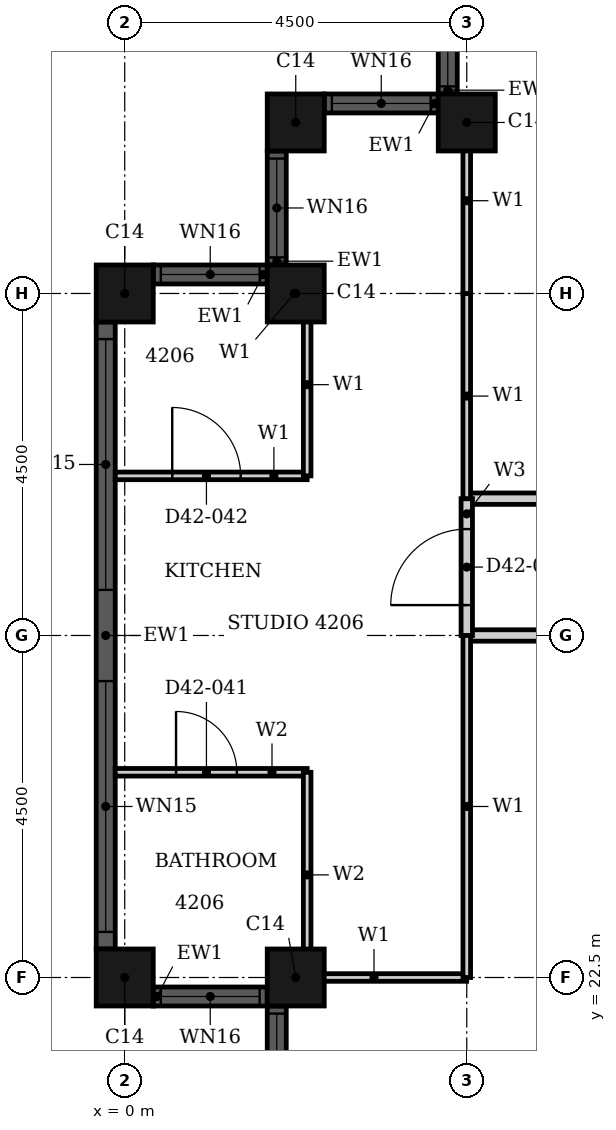
"""IFC4 building model, lengths in metres.
Left out: names, types, materials, properties, quantities, classifications, styles, units other than length and angle.
Written with IfcOpenShell. Run it as: python <this file> out.ifc"""

import sys

from ifc_helpers import new_model, si_unit, direction, frame, frame_2d, origin, origin_2d, place, context, subcontext, project, spatial, rectangle, hollow_rectangle, extrude, element, fill, save


model = new_model("IFC4")
c1 = context("Model", 3, precision=1e-05, world=origin(), true_north=direction((0.0, 1.0)))
c2 = subcontext(c1, "Body", "Model", "MODEL_VIEW")
j1 = project(units=[si_unit("LENGTHUNIT", "METRE"), si_unit("PLANEANGLEUNIT", "RADIAN")], contexts=[c1])
p1 = place(None, origin())
s1 = spatial("IfcSite", under=j1, at=p1, CompositionType="ELEMENT")
p2 = place(p1, origin())
s2 = spatial("IfcBuilding", under=s1, at=p2, CompositionType="ELEMENT")
p3 = place(p2, frame((0.0, 0.0, 169.1)))
s3 = spatial("IfcBuildingStorey", under=s2, at=p3, CompositionType="ELEMENT", Elevation=169.1)
for number, where, z_axis, x_axis in (
    (1, (4.5, 33.75, 0.0), (0.0, 0.0, 1.0), (1.0, 0.0, 0.0)),
    (2, (2.25, 33.75, 0.0), (0.0, 0.0, 1.0), (1.0, 0.0, 0.0)),
    (3, (2.25, 31.5, 0.0), (0.0, 0.0, 1.0), (1.0, 0.0, 0.0)),
    (4, (0.0, 31.5, 0.0), (0.0, 0.0, 1.0), (1.0, 0.0, 0.0)),
    (5, (0.0, 22.5, 0.0), (0.0, 0.0, 1.0), (1.0, 0.0, 0.0)),
    (6, (2.25, 22.5, 0.0), (0.0, 0.0, 1.0), (1.0, 0.0, 0.0)),
):
    element("IfcColumn", number, at=place(p3, frame(where, z_axis=z_axis, x_axis=x_axis)), inside=s3, PredefinedType="COLUMN", context=c2, shape_type="SweptSolid", body=[
        extrude(hollow_rectangle(XDim=0.75, YDim=0.75, WallThickness=0.024, at=origin_2d()), origin(), (0.0, 0.0, 1.0), 3.7),
    ])
p4 = place(p3, frame((4.25, 35.625, 0.0), z_axis=(0.0, 0.0, 1.0), x_axis=(0.0, -1.0, 0.0)))
e7 = element("IfcWall", 7, at=p4, inside=s3, PredefinedType="SOLIDWALL", context=c2, shape_type="SweptSolid", body=[
    extrude(rectangle(XDim=1.5, YDim=0.25, at=frame_2d((0.75, 0.0))), origin(), (0.0, 0.0, 1.0), 3.7),
])
p5 = place(p4, frame((0.1, 0.0, 0.9)))
e8 = element("IfcOpeningElement", 8, at=p5, cuts=e7, PredefinedType="OPENING", context=c2, shape_type="SweptSolid", body=[
    extrude(rectangle(XDim=1.3, YDim=1.85, at=frame_2d((0.65, 0.925))), frame((0.0, 0.135, 0.0), z_axis=(0.0, -1.0, 0.0), x_axis=(1.0, 0.0, 0.0)), (0.0, 0.0, 1.0), 0.27),
])
p6 = place(p3, frame((4.125, 34.0, 0.0), z_axis=(0.0, 0.0, 1.0), x_axis=(-1.0, 0.0, 0.0)))
e9 = element("IfcWall", 9, at=p6, inside=s3, PredefinedType="SOLIDWALL", context=c2, shape_type="SweptSolid", body=[
    extrude(rectangle(XDim=1.5, YDim=0.25, at=frame_2d((0.75, 0.0))), origin(), (0.0, 0.0, 1.0), 3.7),
])
p7 = place(p6, frame((0.1, 0.0, 0.9)))
e10 = element("IfcOpeningElement", 10, at=p7, cuts=e9, PredefinedType="OPENING", context=c2, shape_type="SweptSolid", body=[
    extrude(rectangle(XDim=1.3, YDim=1.85, at=frame_2d((0.65, 0.925))), frame((0.0, 0.135, 0.0), z_axis=(0.0, -1.0, 0.0), x_axis=(1.0, 0.0, 0.0)), (0.0, 0.0, 1.0), 0.27),
])
p8 = place(p3, frame((2.0, 33.375, 0.0), z_axis=(0.0, 0.0, 1.0), x_axis=(0.0, -1.0, 0.0)))
e11 = element("IfcWall", 11, at=p8, inside=s3, PredefinedType="SOLIDWALL", context=c2, shape_type="SweptSolid", body=[
    extrude(rectangle(XDim=1.5, YDim=0.25, at=frame_2d((0.75, 0.0))), origin(), (0.0, 0.0, 1.0), 3.7),
])
p9 = place(p8, frame((0.1, 0.0, 0.9)))
e12 = element("IfcOpeningElement", 12, at=p9, cuts=e11, PredefinedType="OPENING", context=c2, shape_type="SweptSolid", body=[
    extrude(rectangle(XDim=1.3, YDim=1.85, at=frame_2d((0.65, 0.925))), frame((0.0, 0.135, 0.0), z_axis=(0.0, -1.0, 0.0), x_axis=(1.0, 0.0, 0.0)), (0.0, 0.0, 1.0), 0.27),
])
p10 = place(p3, frame((1.875, 31.75, 0.0), z_axis=(0.0, 0.0, 1.0), x_axis=(-1.0, 0.0, 0.0)))
e13 = element("IfcWall", 13, at=p10, inside=s3, PredefinedType="SOLIDWALL", context=c2, shape_type="SweptSolid", body=[
    extrude(rectangle(XDim=1.5, YDim=0.25, at=frame_2d((0.75, 0.0))), origin(), (0.0, 0.0, 1.0), 3.7),
])
p11 = place(p10, frame((0.1, 0.0, 0.9)))
e14 = element("IfcOpeningElement", 14, at=p11, cuts=e13, PredefinedType="OPENING", context=c2, shape_type="SweptSolid", body=[
    extrude(rectangle(XDim=1.3, YDim=1.85, at=frame_2d((0.65, 0.925))), frame((0.0, 0.135, 0.0), z_axis=(0.0, -1.0, 0.0), x_axis=(1.0, 0.0, 0.0)), (0.0, 0.0, 1.0), 0.27),
])
p12 = place(p3, frame((-0.25, 31.125, 0.0), z_axis=(0.0, 0.0, 1.0), x_axis=(0.0, -1.0, 0.0)))
e15 = element("IfcWall", 15, at=p12, inside=s3, PredefinedType="SOLIDWALL", context=c2, shape_type="SweptSolid", body=[
    extrude(rectangle(XDim=8.25, YDim=0.25, at=frame_2d((4.125, 0.0))), origin(), (0.0, 0.0, 1.0), 3.7),
])
p13 = place(p12, frame((0.225, 0.0, 0.45)))
e16 = element("IfcOpeningElement", 16, at=p13, cuts=e15, PredefinedType="OPENING", context=c2, shape_type="SweptSolid", body=[
    extrude(rectangle(XDim=3.3, YDim=2.3, at=frame_2d((1.65, 1.15))), frame((0.0, 0.135, 0.0), z_axis=(0.0, -1.0, 0.0), x_axis=(1.0, 0.0, 0.0)), (0.0, 0.0, 1.0), 0.27),
])
p14 = place(p12, frame((4.725, 0.0, 0.45)))
e17 = element("IfcOpeningElement", 17, at=p14, cuts=e15, PredefinedType="OPENING", context=c2, shape_type="SweptSolid", body=[
    extrude(rectangle(XDim=3.3, YDim=2.3, at=frame_2d((1.65, 1.15))), frame((0.0, 0.135, 0.0), z_axis=(0.0, -1.0, 0.0), x_axis=(1.0, 0.0, 0.0)), (0.0, 0.0, 1.0), 0.27),
])
p15 = place(p3, frame((0.375, 22.25, 0.0), z_axis=(0.0, 0.0, 1.0), x_axis=(1.0, 0.0, 0.0)))
e18 = element("IfcWall", 18, at=p15, inside=s3, PredefinedType="SOLIDWALL", context=c2, shape_type="SweptSolid", body=[
    extrude(rectangle(XDim=1.5, YDim=0.25, at=frame_2d((0.75, 0.0))), origin(), (0.0, 0.0, 1.0), 3.7),
])
p16 = place(p15, frame((0.1, 0.0, 0.9)))
e19 = element("IfcOpeningElement", 19, at=p16, cuts=e18, PredefinedType="OPENING", context=c2, shape_type="SweptSolid", body=[
    extrude(rectangle(XDim=1.3, YDim=1.85, at=frame_2d((0.65, 0.925))), frame((0.0, 0.135, 0.0), z_axis=(0.0, -1.0, 0.0), x_axis=(1.0, 0.0, 0.0)), (0.0, 0.0, 1.0), 0.27),
])
p17 = place(p3, frame((2.0, 22.125, 0.0), z_axis=(0.0, 0.0, 1.0), x_axis=(0.0, -1.0, 0.0)))
e20 = element("IfcWall", 20, at=p17, inside=s3, PredefinedType="SOLIDWALL", context=c2, shape_type="SweptSolid", body=[
    extrude(rectangle(XDim=1.5, YDim=0.25, at=frame_2d((0.75, 0.0))), origin(), (0.0, 0.0, 1.0), 3.7),
])
p18 = place(p17, frame((0.1, 0.0, 0.9)))
e21 = element("IfcOpeningElement", 21, at=p18, cuts=e20, PredefinedType="OPENING", context=c2, shape_type="SweptSolid", body=[
    extrude(rectangle(XDim=1.3, YDim=1.85, at=frame_2d((0.65, 0.925))), frame((0.0, 0.135, 0.0), z_axis=(0.0, -1.0, 0.0), x_axis=(1.0, 0.0, 0.0)), (0.0, 0.0, 1.0), 0.27),
])
p19 = place(p3, frame((4.5, 27.0, 0.0), z_axis=(0.0, 0.0, 1.0), x_axis=(1.0, 0.0, 0.0)))
e22 = element("IfcWall", 22, at=p19, inside=s3, PredefinedType="PARTITIONING", context=c2, shape_type="SweptSolid", body=[
    extrude(rectangle(XDim=13.5, YDim=0.15, at=frame_2d((6.75, 0.0))), origin(), (0.0, 0.0, 1.0), 2.68),
])
p20 = place(p19, frame((5.35, 0.0, 0.0)))
e23 = element("IfcOpeningElement", 23, at=p20, cuts=e22, PredefinedType="OPENING", context=c2, shape_type="SweptSolid", body=[
    extrude(rectangle(XDim=1.0, YDim=2.1, at=frame_2d((0.5, 1.05))), frame((0.0, 0.085, 0.0), z_axis=(0.0, -1.0, 0.0), x_axis=(1.0, 0.0, 0.0)), (0.0, 0.0, 1.0), 0.17),
])
p21 = place(p3, frame((4.5, 28.8, 0.0), z_axis=(0.0, 0.0, 1.0), x_axis=(1.0, 0.0, 0.0)))
e24 = element("IfcWall", 24, at=p21, inside=s3, PredefinedType="PARTITIONING", context=c2, shape_type="SweptSolid", body=[
    extrude(rectangle(XDim=11.699, YDim=0.15, at=frame_2d((5.85, 0.0))), origin(), (0.0, 0.0, 1.0), 3.4),
])
p22 = place(p21, frame((4.0, 0.0, 0.0)))
e25 = element("IfcOpeningElement", 25, at=p22, cuts=e24, PredefinedType="OPENING", context=c2, shape_type="SweptSolid", body=[
    extrude(rectangle(XDim=1.0, YDim=2.1, at=frame_2d((0.5, 1.05))), frame((0.0, 0.085, 0.0), z_axis=(0.0, -1.0, 0.0), x_axis=(1.0, 0.0, 0.0)), (0.0, 0.0, 1.0), 0.17),
])
p23 = place(p3, frame((4.5, 27.0, 0.0), z_axis=(0.0, 0.0, 1.0), x_axis=(0.0, 1.0, 0.0)))
e26 = element("IfcWall", 26, at=p23, inside=s3, PredefinedType="PARTITIONING", context=c2, shape_type="SweptSolid", body=[
    extrude(rectangle(XDim=1.8, YDim=0.15, at=frame_2d((0.9, 0.0))), origin(), (0.0, 0.0, 1.0), 3.4),
])
p24 = place(p23, frame((0.4, 0.0, 0.0)))
e27 = element("IfcOpeningElement", 27, at=p24, cuts=e26, PredefinedType="OPENING", context=c2, shape_type="SweptSolid", body=[
    extrude(rectangle(XDim=1.0, YDim=2.2, at=frame_2d((0.5, 1.1))), frame((0.0, 0.085, 0.0), z_axis=(0.0, -1.0, 0.0), x_axis=(1.0, 0.0, 0.0)), (0.0, 0.0, 1.0), 0.17),
])
p25 = place(p3, frame((2.06, 22.5, 0.0), z_axis=(0.0, 0.0, 1.0), x_axis=(1.0, 0.0, 0.0)))
e28 = element("IfcWall", 28, at=p25, inside=s3, PredefinedType="PARTITIONING", context=c2, shape_type="SweptSolid", body=[
    extrude(rectangle(XDim=2.439, YDim=0.1, at=frame_2d((1.219, 0.0))), origin(), (0.0, 0.0, 1.0), 2.68),
])
p26 = place(p3, frame((-0.125, 29.1, 0.0), z_axis=(0.0, 0.0, 1.0), x_axis=(1.0, 0.0, 0.0)))
e29 = element("IfcWall", 29, at=p26, inside=s3, PredefinedType="PARTITIONING", context=c2, shape_type="SweptSolid", body=[
    extrude(rectangle(XDim=2.525, YDim=0.1, at=frame_2d((1.262, 0.0))), origin(), (0.0, 0.0, 1.0), 3.4),
])
p27 = place(p26, frame((0.75, 0.0, 0.0)))
e30 = element("IfcOpeningElement", 30, at=p27, cuts=e29, PredefinedType="OPENING", context=c2, shape_type="SweptSolid", body=[
    extrude(rectangle(XDim=0.9, YDim=2.1, at=frame_2d((0.45, 1.05))), frame((0.0, 0.06, 0.0), z_axis=(0.0, -1.0, 0.0), x_axis=(1.0, 0.0, 0.0)), (0.0, 0.0, 1.0), 0.12),
])
p28 = place(p3, frame((2.06, 31.5, 0.0), z_axis=(0.0, 0.0, 1.0), x_axis=(1.0, 0.0, 0.0)))
e31 = element("IfcWall", 31, at=p28, inside=s3, PredefinedType="PARTITIONING", context=c2, shape_type="SweptSolid", body=[
    extrude(rectangle(XDim=0.34, YDim=0.1, at=frame_2d((0.17, 0.0))), origin(), (0.0, 0.0, 1.0), 3.4),
])
p29 = place(p3, frame((2.4, 29.1, 0.0), z_axis=(0.0, 0.0, 1.0), x_axis=(0.0, 1.0, 0.0)))
e32 = element("IfcWall", 32, at=p29, inside=s3, PredefinedType="PARTITIONING", context=c2, shape_type="SweptSolid", body=[
    extrude(rectangle(XDim=2.4, YDim=0.1, at=frame_2d((1.2, 0.0))), origin(), (0.0, 0.0, 1.0), 3.4),
])
p30 = place(p3, frame((4.5, 28.8, 0.0), z_axis=(0.0, 0.0, 1.0), x_axis=(0.0, 1.0, 0.0)))
e33 = element("IfcWall", 33, at=p30, inside=s3, PredefinedType="PARTITIONING", context=c2, shape_type="SweptSolid", body=[
    extrude(rectangle(XDim=2.7, YDim=0.1, at=frame_2d((1.35, 0.0))), origin(), (0.0, 0.0, 1.0), 3.4),
])
p31 = place(p3, frame((4.5, 31.501, 0.0), z_axis=(0.0, 0.0, 1.0), x_axis=(0.0, 1.0, 0.0)))
e34 = element("IfcWall", 34, at=p31, inside=s3, PredefinedType="PARTITIONING", context=c2, shape_type="SweptSolid", body=[
    extrude(rectangle(XDim=2.439, YDim=0.1, at=frame_2d((1.219, 0.0))), origin(), (0.0, 0.0, 1.0), 3.4),
])
p32 = place(p3, frame((4.5, 22.5, 0.0), z_axis=(0.0, 0.0, 1.0), x_axis=(0.0, 1.0, 0.0)))
e35 = element("IfcWall", 35, at=p32, inside=s3, PredefinedType="PARTITIONING", context=c2, shape_type="SweptSolid", body=[
    extrude(rectangle(XDim=4.5, YDim=0.1, at=frame_2d((2.25, 0.0))), origin(), (0.0, 0.0, 1.0), 3.4),
])
p33 = place(p3, frame((-0.125, 25.2, 0.0), z_axis=(0.0, 0.0, 1.0), x_axis=(1.0, 0.0, 0.0)))
e36 = element("IfcWall", 36, at=p33, inside=s3, PredefinedType="PARTITIONING", context=c2, shape_type="SweptSolid", body=[
    extrude(rectangle(XDim=2.525, YDim=0.1, at=frame_2d((1.262, 0.0))), origin(), (0.0, 0.0, 1.0), 3.4),
])
p34 = place(p33, frame((0.8, 0.0, 0.0)))
e37 = element("IfcOpeningElement", 37, at=p34, cuts=e36, PredefinedType="OPENING", context=c2, shape_type="SweptSolid", body=[
    extrude(rectangle(XDim=0.8, YDim=2.1, at=frame_2d((0.4, 1.05))), frame((0.0, 0.06, 0.0), z_axis=(0.0, -1.0, 0.0), x_axis=(1.0, 0.0, 0.0)), (0.0, 0.0, 1.0), 0.12),
])
p35 = place(p3, frame((2.4, 22.5, 0.0), z_axis=(0.0, 0.0, 1.0), x_axis=(0.0, 1.0, 0.0)))
e38 = element("IfcWall", 38, at=p35, inside=s3, PredefinedType="PARTITIONING", context=c2, shape_type="SweptSolid", body=[
    extrude(rectangle(XDim=2.7, YDim=0.1, at=frame_2d((1.35, 0.0))), origin(), (0.0, 0.0, 1.0), 3.4),
])
p36 = place(p5, origin())
e39 = element("IfcWindow", 39, at=p36, inside=s3, PartitioningType="SINGLE_PANEL", PredefinedType="WINDOW", context=c2, shape_type="SweptSolid", body=[
    extrude(rectangle(XDim=1.3, YDim=1.85, at=frame_2d((0.65, 0.925))), frame((0.0, 0.03, 0.0), z_axis=(0.0, -1.0, 0.0), x_axis=(1.0, 0.0, 0.0)), (0.0, 0.0, 1.0), 0.06),
])
fill(e8, e39)
p37 = place(p7, origin())
e40 = element("IfcWindow", 40, at=p37, inside=s3, PartitioningType="SINGLE_PANEL", PredefinedType="WINDOW", context=c2, shape_type="SweptSolid", body=[
    extrude(rectangle(XDim=1.3, YDim=1.85, at=frame_2d((0.65, 0.925))), frame((0.0, 0.03, 0.0), z_axis=(0.0, -1.0, 0.0), x_axis=(1.0, 0.0, 0.0)), (0.0, 0.0, 1.0), 0.06),
])
fill(e10, e40)
p38 = place(p9, origin())
e41 = element("IfcWindow", 41, at=p38, inside=s3, PartitioningType="SINGLE_PANEL", PredefinedType="WINDOW", context=c2, shape_type="SweptSolid", body=[
    extrude(rectangle(XDim=1.3, YDim=1.85, at=frame_2d((0.65, 0.925))), frame((0.0, 0.03, 0.0), z_axis=(0.0, -1.0, 0.0), x_axis=(1.0, 0.0, 0.0)), (0.0, 0.0, 1.0), 0.06),
])
fill(e12, e41)
p39 = place(p11, origin())
e42 = element("IfcWindow", 42, at=p39, inside=s3, PartitioningType="SINGLE_PANEL", PredefinedType="WINDOW", context=c2, shape_type="SweptSolid", body=[
    extrude(rectangle(XDim=1.3, YDim=1.85, at=frame_2d((0.65, 0.925))), frame((0.0, 0.03, 0.0), z_axis=(0.0, -1.0, 0.0), x_axis=(1.0, 0.0, 0.0)), (0.0, 0.0, 1.0), 0.06),
])
fill(e14, e42)
p40 = place(p13, origin())
e43 = element("IfcWindow", 43, at=p40, inside=s3, PartitioningType="SINGLE_PANEL", PredefinedType="WINDOW", context=c2, shape_type="SweptSolid", body=[
    extrude(rectangle(XDim=3.3, YDim=2.3, at=frame_2d((1.65, 1.15))), frame((0.0, 0.03, 0.0), z_axis=(0.0, -1.0, 0.0), x_axis=(1.0, 0.0, 0.0)), (0.0, 0.0, 1.0), 0.06),
])
fill(e16, e43)
p41 = place(p14, origin())
e44 = element("IfcWindow", 44, at=p41, inside=s3, PartitioningType="SINGLE_PANEL", PredefinedType="WINDOW", context=c2, shape_type="SweptSolid", body=[
    extrude(rectangle(XDim=3.3, YDim=2.3, at=frame_2d((1.65, 1.15))), frame((0.0, 0.03, 0.0), z_axis=(0.0, -1.0, 0.0), x_axis=(1.0, 0.0, 0.0)), (0.0, 0.0, 1.0), 0.06),
])
fill(e17, e44)
p42 = place(p16, origin())
e45 = element("IfcWindow", 45, at=p42, inside=s3, PartitioningType="SINGLE_PANEL", PredefinedType="WINDOW", context=c2, shape_type="SweptSolid", body=[
    extrude(rectangle(XDim=1.3, YDim=1.85, at=frame_2d((0.65, 0.925))), frame((0.0, 0.03, 0.0), z_axis=(0.0, -1.0, 0.0), x_axis=(1.0, 0.0, 0.0)), (0.0, 0.0, 1.0), 0.06),
])
fill(e19, e45)
p43 = place(p18, origin())
e46 = element("IfcWindow", 46, at=p43, inside=s3, PartitioningType="SINGLE_PANEL", PredefinedType="WINDOW", context=c2, shape_type="SweptSolid", body=[
    extrude(rectangle(XDim=1.3, YDim=1.85, at=frame_2d((0.65, 0.925))), frame((0.0, 0.03, 0.0), z_axis=(0.0, -1.0, 0.0), x_axis=(1.0, 0.0, 0.0)), (0.0, 0.0, 1.0), 0.06),
])
fill(e21, e46)
p44 = place(p24, origin())
e47 = element("IfcDoor", 47, at=p44, inside=s3, OperationType="SINGLE_SWING_RIGHT", PredefinedType="DOOR", context=c2, shape_type="SweptSolid", body=[
    extrude(rectangle(XDim=1.0, YDim=2.2, at=frame_2d((0.5, 1.1))), frame((0.0, 0.025, 0.0), z_axis=(0.0, -1.0, 0.0), x_axis=(1.0, 0.0, 0.0)), (0.0, 0.0, 1.0), 0.05),
])
fill(e27, e47)
p45 = place(p34, origin())
e48 = element("IfcDoor", 48, at=p45, inside=s3, OperationType="SINGLE_SWING_RIGHT", PredefinedType="DOOR", context=c2, shape_type="SweptSolid", body=[
    extrude(rectangle(XDim=0.8, YDim=2.1, at=frame_2d((0.4, 1.05))), frame((0.0, 0.025, 0.0), z_axis=(0.0, -1.0, 0.0), x_axis=(1.0, 0.0, 0.0)), (0.0, 0.0, 1.0), 0.05),
])
fill(e37, e48)
p46 = place(p27, origin())
e49 = element("IfcDoor", 49, at=p46, inside=s3, OperationType="SINGLE_SWING_RIGHT", PredefinedType="DOOR", context=c2, shape_type="SweptSolid", body=[
    extrude(rectangle(XDim=0.9, YDim=2.1, at=frame_2d((0.45, 1.05))), frame((0.0, 0.025, 0.0), z_axis=(0.0, -1.0, 0.0), x_axis=(1.0, 0.0, 0.0)), (0.0, 0.0, 1.0), 0.05),
])
fill(e30, e49)
save(model, sys.argv[1])
